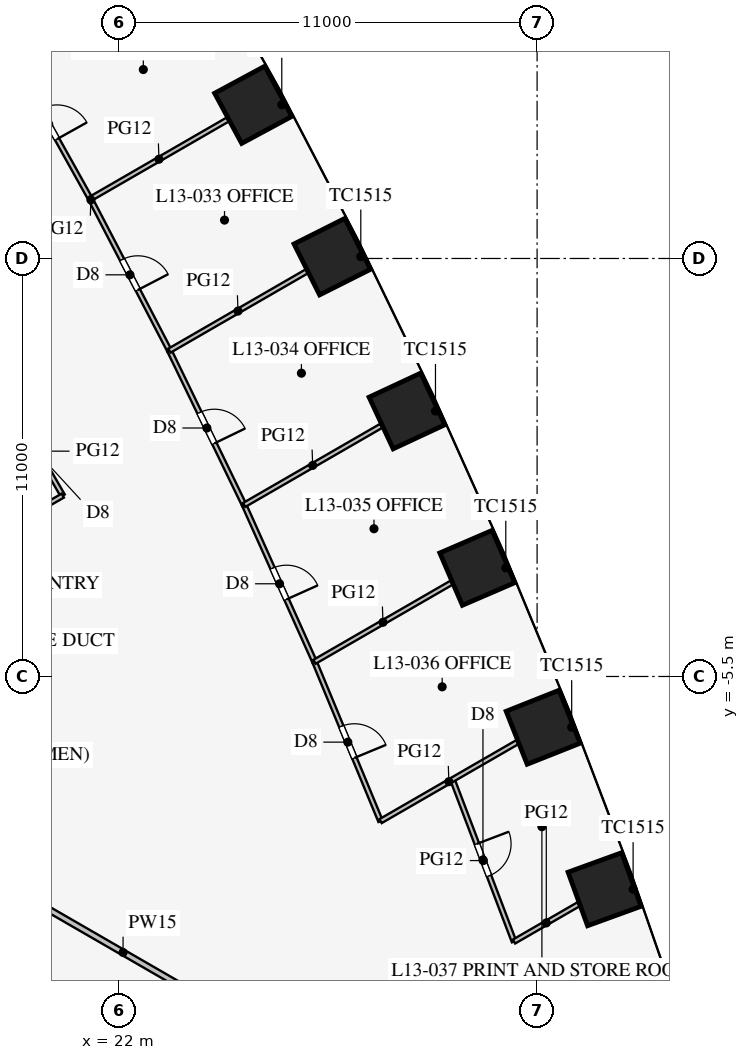
"""IFC4 building model, lengths in metres.
Left out: names, types, materials, properties, quantities, classifications, styles, units other than length and angle.
Written with IfcOpenShell. Run it as: python <this file> out.ifc"""

import sys

from ifc_helpers import new_model, si_unit, direction, frame, frame_2d, origin, origin_2d, place, context, subcontext, project, spatial, rectangle, extrude, element, fill, save


model = new_model("IFC4")
c1 = context("Model", 3, precision=1e-05, world=origin(), true_north=direction((0.0, 1.0)))
c2 = subcontext(c1, "Body", "Model", "MODEL_VIEW")
j1 = project(units=[si_unit("LENGTHUNIT", "METRE"), si_unit("PLANEANGLEUNIT", "RADIAN")], contexts=[c1])
p1 = place(None, origin())
s1 = spatial("IfcSite", under=j1, at=p1, CompositionType="ELEMENT")
p2 = place(p1, origin())
s2 = spatial("IfcBuilding", under=s1, at=p2, CompositionType="ELEMENT")
p3 = place(p2, frame((0.0, 0.0, 58.5)))
s3 = spatial("IfcBuildingStorey", under=s2, at=p3, CompositionType="ELEMENT", Elevation=58.5)
for number, where, z_axis, x_axis in (
    (1, (34.776, -11.099, 0.0), (0.0, 0.0, 1.0), (-0.342, 0.94, 0.0)),
    (2, (33.16, -6.836, 0.0), (0.0, 0.0, 1.0), (-0.369, 0.929, 0.0)),
    (3, (31.426, -2.641, 0.0), (0.0, 0.0, 1.0), (-0.396, 0.918, 0.0)),
    (4, (29.576, 1.487, 0.0), (0.0, 0.0, 1.0), (-0.423, 0.906, 0.0)),
    (5, (27.611, 5.549, 0.0), (0.0, 0.0, 1.0), (-0.449, 0.894, 0.0)),
    (6, (25.531, 9.544, 0.0), (0.0, 0.0, 1.0), (-0.475, 0.88, 0.0)),
):
    element("IfcColumn", number, at=place(p3, frame(where, z_axis=z_axis, x_axis=x_axis)), inside=s3, PredefinedType="COLUMN", context=c2, shape_type="SweptSolid", body=[
        extrude(rectangle(XDim=1.5, YDim=1.5, at=origin_2d()), origin(), (0.0, 0.0, 1.0), 4.2),
    ])
p4 = place(p3, frame((14.203, -8.2, 0.0), z_axis=(0.0, 0.0, 1.0), x_axis=(0.866024965723, -0.500000758745, 0.0)))
e7 = element("IfcWall", 7, at=p4, inside=s3, PredefinedType="PARTITIONING", context=c2, shape_type="SweptSolid", body=[
    extrude(rectangle(XDim=18.25, YDim=0.15, at=frame_2d((9.125, 0.0))), origin(), (0.0, 0.0, 1.0), 2.3),
])
p5 = place(p3, frame((20.519, -0.74, 0.0), z_axis=(0.0, 0.0, 1.0), x_axis=(-0.4999416173, 0.866059108428, 0.0)))
e8 = element("IfcWall", 8, at=p5, inside=s3, PredefinedType="PARTITIONING", context=c2, shape_type="SweptSolid", body=[
    extrude(rectangle(XDim=2.7, YDim=0.12, at=frame_2d((1.35, 0.0))), origin(), (0.0, 0.0, 1.0), 2.9),
])
p6 = place(p5, frame((0.8, 0.0, 0.15)))
e9 = element("IfcOpeningElement", 9, at=p6, cuts=e8, PredefinedType="OPENING", context=c2, shape_type="SweptSolid", body=[
    extrude(rectangle(XDim=0.9, YDim=2.1, at=frame_2d((0.45, 1.05))), frame((0.0, 0.07, 0.0), z_axis=(0.0, -1.0, 0.0), x_axis=(1.0, 0.0, 0.0)), (0.0, 0.0, 1.0), 0.14),
])
p7 = place(p3, frame((17.055, -2.74, 0.0), z_axis=(0.0, 0.0, 1.0), x_axis=(0.866026010844, 0.49999894854, 0.0)))
e10 = element("IfcWall", 10, at=p7, inside=s3, PredefinedType="PARTITIONING", context=c2, shape_type="SweptSolid", body=[
    extrude(rectangle(XDim=4.0, YDim=0.12, at=frame_2d((2.0, 0.0))), origin(), (0.0, 0.0, 1.0), 2.9),
])
p8 = place(p3, frame((25.292, -0.986, 0.0), z_axis=(0.0, 0.0, 1.0), x_axis=(-0.435857917556, 0.900015486369, 0.0)))
e11 = element("IfcWall", 11, at=p8, inside=s3, PredefinedType="PARTITIONING", context=c2, shape_type="SweptSolid", body=[
    extrude(rectangle(XDim=4.512, YDim=0.12, at=frame_2d((2.256, 0.0))), origin(), (0.0, 0.0, 1.0), 2.9),
])
p9 = place(p8, frame((1.8, 0.0, 0.15)))
e12 = element("IfcOpeningElement", 12, at=p9, cuts=e11, PredefinedType="OPENING", context=c2, shape_type="SweptSolid", body=[
    extrude(rectangle(XDim=0.9, YDim=2.1, at=frame_2d((0.45, 1.05))), frame((0.0, 0.07, 0.0), z_axis=(0.0, -1.0, 0.0), x_axis=(1.0, 0.0, 0.0)), (0.0, 0.0, 1.0), 0.14),
])
p10 = place(p3, frame((27.144, -5.113, 0.0), z_axis=(0.0, 0.0, 1.0), x_axis=(-0.409451055745, 0.912332084796, 0.0)))
e13 = element("IfcWall", 13, at=p10, inside=s3, PredefinedType="PARTITIONING", context=c2, shape_type="SweptSolid", body=[
    extrude(rectangle(XDim=4.523, YDim=0.12, at=frame_2d((2.262, 0.0))), origin(), (0.0, 0.0, 1.0), 2.9),
])
p11 = place(p10, frame((1.8, 0.0, 0.15)))
e14 = element("IfcOpeningElement", 14, at=p11, cuts=e13, PredefinedType="OPENING", context=c2, shape_type="SweptSolid", body=[
    extrude(rectangle(XDim=0.9, YDim=2.1, at=frame_2d((0.45, 1.05))), frame((0.0, 0.07, 0.0), z_axis=(0.0, -1.0, 0.0), x_axis=(1.0, 0.0, 0.0)), (0.0, 0.0, 1.0), 0.14),
])
p12 = place(p3, frame((28.88, -9.307, 0.0), z_axis=(0.0, 0.0, 1.0), x_axis=(-0.382594071331, 0.923916542001, 0.0)))
e15 = element("IfcWall", 15, at=p12, inside=s3, PredefinedType="PARTITIONING", context=c2, shape_type="SweptSolid", body=[
    extrude(rectangle(XDim=4.539, YDim=0.12, at=frame_2d((2.27, 0.0))), origin(), (0.0, 0.0, 1.0), 2.9),
])
p13 = place(p12, frame((1.8, 0.0, 0.15)))
e16 = element("IfcOpeningElement", 16, at=p13, cuts=e15, PredefinedType="OPENING", context=c2, shape_type="SweptSolid", body=[
    extrude(rectangle(XDim=0.9, YDim=2.1, at=frame_2d((0.45, 1.05))), frame((0.0, 0.07, 0.0), z_axis=(0.0, -1.0, 0.0), x_axis=(1.0, 0.0, 0.0)), (0.0, 0.0, 1.0), 0.14),
])
p14 = place(p3, frame((32.393, -12.475, 0.0), z_axis=(0.0, 0.0, 1.0), x_axis=(-0.355351603025, 0.93473270951, 0.0)))
e17 = element("IfcWall", 17, at=p14, inside=s3, PredefinedType="PARTITIONING", context=c2, shape_type="SweptSolid", body=[
    extrude(rectangle(XDim=4.559, YDim=0.12, at=frame_2d((2.279, 0.0))), origin(), (0.0, 0.0, 1.0), 2.9),
])
p15 = place(p14, frame((1.85, 0.0, 0.15)))
e18 = element("IfcOpeningElement", 18, at=p15, cuts=e17, PredefinedType="OPENING", context=c2, shape_type="SweptSolid", body=[
    extrude(rectangle(XDim=0.9, YDim=2.1, at=frame_2d((0.45, 1.05))), frame((0.0, 0.07, 0.0), z_axis=(0.0, -1.0, 0.0), x_axis=(1.0, 0.0, 0.0)), (0.0, 0.0, 1.0), 0.14),
])
p16 = place(p3, frame((21.245, 7.07, 0.0), z_axis=(0.0, 0.0, 1.0), x_axis=(-0.487373854787, 0.873193406795, 0.0)))
e19 = element("IfcWall", 19, at=p16, inside=s3, PredefinedType="PARTITIONING", context=c2, shape_type="SweptSolid", body=[
    extrude(rectangle(XDim=4.5, YDim=0.12, at=frame_2d((2.25, 0.0))), origin(), (0.0, 0.0, 1.0), 2.9),
])
p17 = place(p16, frame((1.8, 0.0, 0.15)))
e20 = element("IfcOpeningElement", 20, at=p17, cuts=e19, PredefinedType="OPENING", context=c2, shape_type="SweptSolid", body=[
    extrude(rectangle(XDim=0.9, YDim=2.1, at=frame_2d((0.45, 1.05))), frame((0.0, 0.07, 0.0), z_axis=(0.0, -1.0, 0.0), x_axis=(1.0, 0.0, 0.0)), (0.0, 0.0, 1.0), 0.14),
])
p18 = place(p3, frame((23.325, 3.074, 0.0), z_axis=(0.0, 0.0, 1.0), x_axis=(-0.461852697957, 0.886956642339, 0.0)))
e21 = element("IfcWall", 21, at=p18, inside=s3, PredefinedType="PARTITIONING", context=c2, shape_type="SweptSolid", body=[
    extrude(rectangle(XDim=4.504, YDim=0.12, at=frame_2d((2.252, 0.0))), origin(), (0.0, 0.0, 1.0), 2.9),
])
p19 = place(p18, frame((1.8, 0.0, 0.15)))
e22 = element("IfcOpeningElement", 22, at=p19, cuts=e21, PredefinedType="OPENING", context=c2, shape_type="SweptSolid", body=[
    extrude(rectangle(XDim=0.9, YDim=2.1, at=frame_2d((0.45, 1.05))), frame((0.0, 0.07, 0.0), z_axis=(0.0, -1.0, 0.0), x_axis=(1.0, 0.0, 0.0)), (0.0, 0.0, 1.0), 0.14),
])
p20 = place(p3, frame((25.292, -0.986, 0.0), z_axis=(0.0, 0.0, 1.0), x_axis=(0.866011781705, 0.500023593391, 0.0)))
e23 = element("IfcWall", 23, at=p20, inside=s3, PredefinedType="PARTITIONING", context=c2, shape_type="SweptSolid", body=[
    extrude(rectangle(XDim=4.164, YDim=0.12, at=frame_2d((2.082, 0.0))), origin(), (0.0, 0.0, 1.0), 2.6),
])
p21 = place(p3, frame((27.144, -5.113, 0.0), z_axis=(0.0, 0.0, 1.0), x_axis=(0.866031144707, 0.499990056298, 0.0)))
e24 = element("IfcWall", 24, at=p21, inside=s3, PredefinedType="PARTITIONING", context=c2, shape_type="SweptSolid", body=[
    extrude(rectangle(XDim=4.159, YDim=0.12, at=frame_2d((2.08, 0.0))), origin(), (0.0, 0.0, 1.0), 2.6),
])
p22 = place(p3, frame((28.88, -9.307, 0.0), z_axis=(0.0, 0.0, 1.0), x_axis=(0.866027987673, 0.499995524547, 0.0)))
e25 = element("IfcWall", 25, at=p22, inside=s3, PredefinedType="PARTITIONING", context=c2, shape_type="SweptSolid", body=[
    extrude(rectangle(XDim=4.153, YDim=0.12, at=frame_2d((2.077, 0.0))), origin(), (0.0, 0.0, 1.0), 2.8),
])
p23 = place(p3, frame((32.393, -12.475, 0.0), z_axis=(0.0, 0.0, 1.0), x_axis=(0.865996887259, 0.500049388818, 0.0)))
e26 = element("IfcWall", 26, at=p23, inside=s3, PredefinedType="PARTITIONING", context=c2, shape_type="SweptSolid", body=[
    extrude(rectangle(XDim=1.961, YDim=0.12, at=frame_2d((0.98, 0.0))), origin(), (0.0, 0.0, 1.0), 2.9),
])
p24 = place(p3, frame((21.245, 7.07, 0.0), z_axis=(0.0, 0.0, 1.0), x_axis=(0.866025669538, 0.499999539701, 0.0)))
e27 = element("IfcWall", 27, at=p24, inside=s3, PredefinedType="PARTITIONING", context=c2, shape_type="SweptSolid", body=[
    extrude(rectangle(XDim=4.169, YDim=0.12, at=frame_2d((2.085, 0.0))), origin(), (0.0, 0.0, 1.0), 2.8),
])
p25 = place(p3, frame((23.325, 3.074, 0.0), z_axis=(0.0, 0.0, 1.0), x_axis=(0.866009971343, 0.50002672882, 0.0)))
e28 = element("IfcWall", 28, at=p25, inside=s3, PredefinedType="PARTITIONING", context=c2, shape_type="SweptSolid", body=[
    extrude(rectangle(XDim=4.167, YDim=0.12, at=frame_2d((2.083, 0.0))), origin(), (0.0, 0.0, 1.0), 2.8),
])
p26 = place(p17, frame((0.9, 0.0, 0.0), z_axis=(0.0, 0.0, 1.0), x_axis=(-1.0, 0.0, 0.0)))
e29 = element("IfcDoor", 29, at=p26, inside=s3, OperationType="SINGLE_SWING_RIGHT", PredefinedType="DOOR", context=c2, shape_type="SweptSolid", body=[
    extrude(rectangle(XDim=0.9, YDim=2.1, at=frame_2d((0.45, 1.05))), frame((0.0, 0.025, 0.0), z_axis=(0.0, -1.0, 0.0), x_axis=(1.0, 0.0, 0.0)), (0.0, 0.0, 1.0), 0.05),
])
fill(e20, e29)
p27 = place(p19, frame((0.9, 0.0, 0.0), z_axis=(0.0, 0.0, 1.0), x_axis=(-1.0, 0.0, 0.0)))
e30 = element("IfcDoor", 30, at=p27, inside=s3, OperationType="SINGLE_SWING_RIGHT", PredefinedType="DOOR", context=c2, shape_type="SweptSolid", body=[
    extrude(rectangle(XDim=0.9, YDim=2.1, at=frame_2d((0.45, 1.05))), frame((0.0, 0.025, 0.0), z_axis=(0.0, -1.0, 0.0), x_axis=(1.0, 0.0, 0.0)), (0.0, 0.0, 1.0), 0.05),
])
fill(e22, e30)
p28 = place(p9, frame((0.9, 0.0, 0.0), z_axis=(0.0, 0.0, 1.0), x_axis=(-1.0, 0.0, 0.0)))
e31 = element("IfcDoor", 31, at=p28, inside=s3, OperationType="SINGLE_SWING_RIGHT", PredefinedType="DOOR", context=c2, shape_type="SweptSolid", body=[
    extrude(rectangle(XDim=0.9, YDim=2.1, at=frame_2d((0.45, 1.05))), frame((0.0, 0.025, 0.0), z_axis=(0.0, -1.0, 0.0), x_axis=(1.0, 0.0, 0.0)), (0.0, 0.0, 1.0), 0.05),
])
fill(e12, e31)
p29 = place(p11, frame((0.9, 0.0, 0.0), z_axis=(0.0, 0.0, 1.0), x_axis=(-1.0, 0.0, 0.0)))
e32 = element("IfcDoor", 32, at=p29, inside=s3, OperationType="SINGLE_SWING_RIGHT", PredefinedType="DOOR", context=c2, shape_type="SweptSolid", body=[
    extrude(rectangle(XDim=0.9, YDim=2.1, at=frame_2d((0.45, 1.05))), frame((0.0, 0.025, 0.0), z_axis=(0.0, -1.0, 0.0), x_axis=(1.0, 0.0, 0.0)), (0.0, 0.0, 1.0), 0.05),
])
fill(e14, e32)
p30 = place(p13, frame((0.9, 0.0, 0.0), z_axis=(0.0, 0.0, 1.0), x_axis=(-1.0, 0.0, 0.0)))
e33 = element("IfcDoor", 33, at=p30, inside=s3, OperationType="SINGLE_SWING_RIGHT", PredefinedType="DOOR", context=c2, shape_type="SweptSolid", body=[
    extrude(rectangle(XDim=0.9, YDim=2.1, at=frame_2d((0.45, 1.05))), frame((0.0, 0.025, 0.0), z_axis=(0.0, -1.0, 0.0), x_axis=(1.0, 0.0, 0.0)), (0.0, 0.0, 1.0), 0.05),
])
fill(e16, e33)
p31 = place(p15, frame((0.9, 0.0, 0.0), z_axis=(0.0, 0.0, 1.0), x_axis=(-1.0, 0.0, 0.0)))
e34 = element("IfcDoor", 34, at=p31, inside=s3, OperationType="SINGLE_SWING_LEFT", PredefinedType="DOOR", context=c2, shape_type="SweptSolid", body=[
    extrude(rectangle(XDim=0.9, YDim=2.1, at=frame_2d((0.45, 1.05))), frame((0.0, 0.025, 0.0), z_axis=(0.0, -1.0, 0.0), x_axis=(1.0, 0.0, 0.0)), (0.0, 0.0, 1.0), 0.05),
])
fill(e18, e34)
save(model, sys.argv[1])
